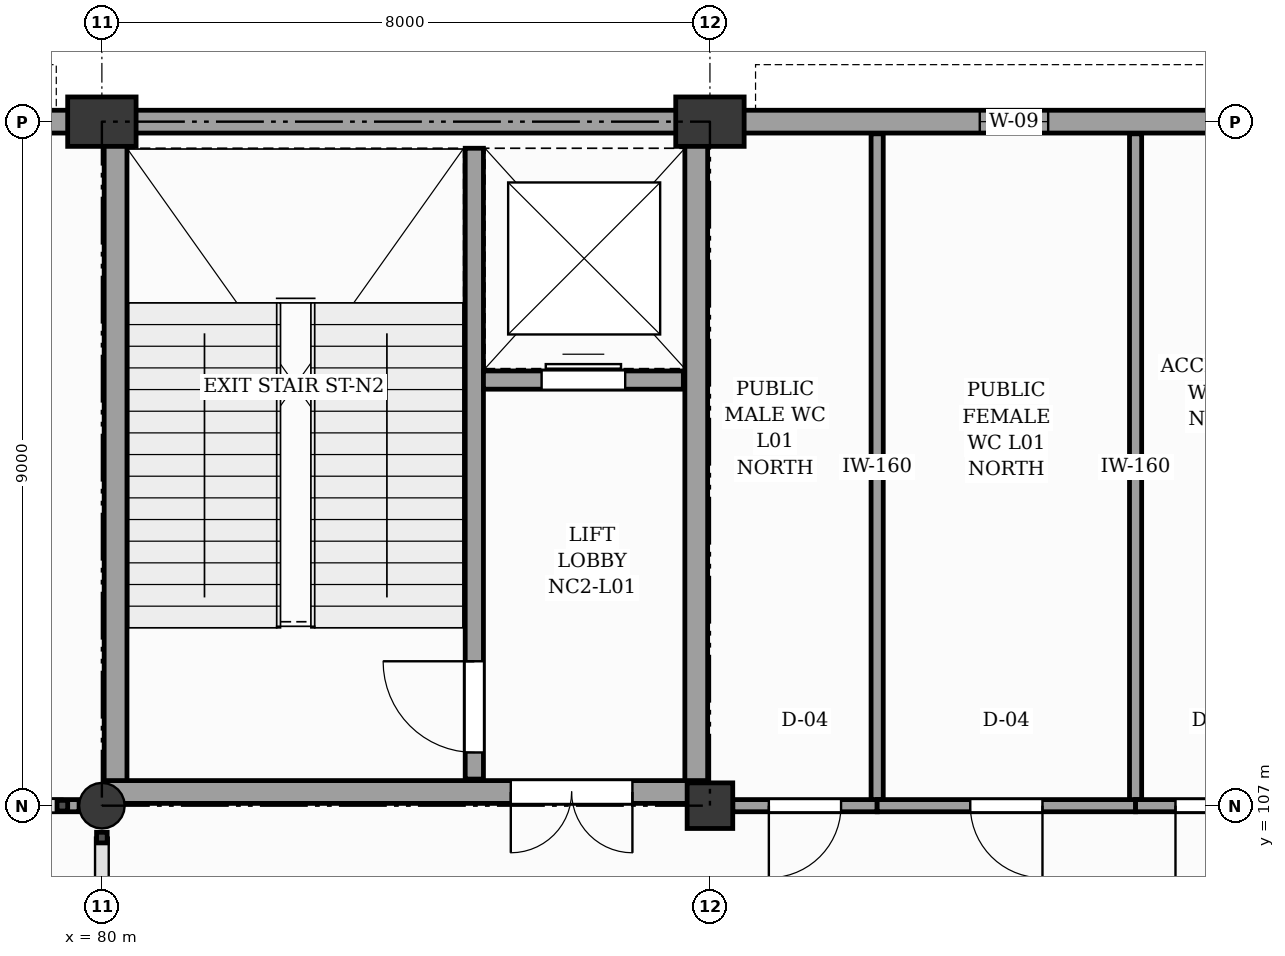
"""IFC4 building model, lengths in metres.
Left out: names, types, materials, properties, quantities, classifications, styles, units other than length and angle.
Written with IfcOpenShell. Run it as: python <this file> out.ifc"""

import sys

from ifc_helpers import new_model, si_unit, direction, frame, frame_2d, origin, origin_2d, place, context, subcontext, project, spatial, rectangle, circle, extrude, element, fill, save


model = new_model("IFC4")
c1 = context("Model", 3, precision=1e-05, world=origin(), true_north=direction((0.0, 1.0)))
c2 = subcontext(c1, "Body", "Model", "MODEL_VIEW")
j1 = project(units=[si_unit("LENGTHUNIT", "METRE"), si_unit("PLANEANGLEUNIT", "RADIAN")], contexts=[c1])
p1 = place(None, origin())
s1 = spatial("IfcSite", under=j1, at=p1, CompositionType="ELEMENT")
p2 = place(p1, origin())
s2 = spatial("IfcBuilding", under=s1, at=p2, CompositionType="ELEMENT")
p3 = place(p2, frame((0.0, 0.0, 4.8)))
s3 = spatial("IfcBuildingStorey", under=s2, at=p3, CompositionType="ELEMENT", Elevation=4.8)
p4 = place(p3, frame((80.0, 107.0, 0.0), z_axis=(0.0, 0.0, 1.0), x_axis=(1.0, 0.0, 0.0)))
e1 = element("IfcColumn", 1, at=p4, inside=s3, PredefinedType="COLUMN", context=c2, shape_type="SweptSolid", body=[
    extrude(circle(Radius=0.3, at=origin_2d()), origin(), (0.0, 0.0, 1.0), 4.8),
])
p5 = place(p3, frame((80.0, 116.0, 0.0), z_axis=(0.0, 0.0, 1.0), x_axis=(1.0, 0.0, 0.0)))
e2 = element("IfcColumn", 2, at=p5, inside=s3, PredefinedType="PILASTER", context=c2, shape_type="SweptSolid", body=[
    extrude(rectangle(XDim=0.9, YDim=0.65, at=origin_2d()), origin(), (0.0, 0.0, 1.0), 4.8),
])
p6 = place(p3, frame((88.0, 107.0, 0.0), z_axis=(0.0, 0.0, 1.0), x_axis=(1.0, 0.0, 0.0)))
e3 = element("IfcColumn", 3, at=p6, inside=s3, PredefinedType="COLUMN", context=c2, shape_type="SweptSolid", body=[
    extrude(rectangle(XDim=0.6, YDim=0.6, at=origin_2d()), origin(), (0.0, 0.0, 1.0), 4.8),
])
p7 = place(p3, frame((88.0, 116.0, 0.0), z_axis=(0.0, 0.0, 1.0), x_axis=(1.0, 0.0, 0.0)))
e4 = element("IfcColumn", 4, at=p7, inside=s3, PredefinedType="PILASTER", context=c2, shape_type="SweptSolid", body=[
    extrude(rectangle(XDim=0.9, YDim=0.65, at=origin_2d()), origin(), (0.0, 0.0, 1.0), 4.8),
])
p8 = place(p3, frame((72.4, 116.0, 0.0), z_axis=(0.0, 0.0, 1.0), x_axis=(1.0, 0.0, 0.0)))
e5 = element("IfcWall", 5, at=p8, inside=s3, PredefinedType="SOLIDWALL", context=c2, shape_type="SweptSolid", body=[
    extrude(rectangle(XDim=7.2, YDim=0.3, at=frame_2d((3.6, 0.0))), origin(), (0.0, 0.0, 1.0), 3.84),
])
p9 = place(p8, frame((2.5, 0.0, 0.9)))
e6 = element("IfcOpeningElement", 6, at=p9, cuts=e5, PredefinedType="OPENING", context=c2, shape_type="SweptSolid", body=[
    extrude(rectangle(XDim=2.2, YDim=2.2, at=frame_2d((1.1, 1.1))), frame((0.0, 0.16, 0.0), z_axis=(0.0, -1.0, 0.0), x_axis=(1.0, 0.0, 0.0)), (0.0, 0.0, 1.0), 0.32),
])
p10 = place(p3, frame((80.4, 116.0, 0.0), z_axis=(0.0, 0.0, 1.0), x_axis=(1.0, 0.0, 0.0)))
e7 = element("IfcWall", 7, at=p10, inside=s3, PredefinedType="SOLIDWALL", context=c2, shape_type="SweptSolid", body=[
    extrude(rectangle(XDim=7.2, YDim=0.3, at=frame_2d((3.6, 0.0))), origin(), (0.0, 0.0, 1.0), 3.84),
])
p11 = place(p3, frame((88.4, 116.0, 0.0), z_axis=(0.0, 0.0, 1.0), x_axis=(1.0, 0.0, 0.0)))
e8 = element("IfcWall", 8, at=p11, inside=s3, PredefinedType="SOLIDWALL", context=c2, shape_type="SweptSolid", body=[
    extrude(rectangle(XDim=7.2, YDim=0.3, at=frame_2d((3.6, 0.0))), origin(), (0.0, 0.0, 1.0), 3.84),
])
p12 = place(p11, frame((3.15, 0.0, 0.9)))
e9 = element("IfcOpeningElement", 9, at=p12, cuts=e8, PredefinedType="OPENING", context=c2, shape_type="SweptSolid", body=[
    extrude(rectangle(XDim=0.9, YDim=1.1, at=frame_2d((0.45, 0.55))), frame((0.0, 0.16, 0.0), z_axis=(0.0, -1.0, 0.0), x_axis=(1.0, 0.0, 0.0)), (0.0, 0.0, 1.0), 0.32),
])
p13 = place(p3, frame((84.9, 107.35, 0.0), z_axis=(0.0, 0.0, 1.0), x_axis=(0.0, 1.0, 0.0)))
e10 = element("IfcWall", 10, at=p13, inside=s3, PredefinedType="SHEAR", context=c2, shape_type="SweptSolid", body=[
    extrude(rectangle(XDim=8.3, YDim=0.24, at=frame_2d((4.15, 0.0))), origin(), (0.0, 0.0, 1.0), 4.52),
])
p14 = place(p13, frame((0.35, 0.0, 0.0)))
e11 = element("IfcOpeningElement", 11, at=p14, cuts=e10, PredefinedType="OPENING", context=c2, shape_type="SweptSolid", body=[
    extrude(rectangle(XDim=1.2, YDim=2.15, at=frame_2d((0.6, 1.075))), frame((0.0, 0.13, 0.0), z_axis=(0.0, -1.0, 0.0), x_axis=(1.0, 0.0, 0.0)), (0.0, 0.0, 1.0), 0.26),
])
p15 = place(p3, frame((85.02, 112.6, 0.0), z_axis=(0.0, 0.0, 1.0), x_axis=(1.0, 0.0, 0.0)))
e12 = element("IfcWall", 12, at=p15, inside=s3, PredefinedType="SHEAR", context=c2, shape_type="SweptSolid", body=[
    extrude(rectangle(XDim=2.63, YDim=0.24, at=frame_2d((1.315, 0.0))), origin(), (0.0, 0.0, 1.0), 4.52),
])
p16 = place(p15, frame((0.765, 0.0, 0.0)))
e13 = element("IfcOpeningElement", 13, at=p16, cuts=e12, PredefinedType="OPENING", context=c2, shape_type="SweptSolid", body=[
    extrude(rectangle(XDim=1.1, YDim=2.15, at=frame_2d((0.55, 1.075))), frame((0.0, 0.13, 0.0), z_axis=(0.0, -1.0, 0.0), x_axis=(1.0, 0.0, 0.0)), (0.0, 0.0, 1.0), 0.26),
])
for number, where, z_axis, x_axis in (
    (14, (80.18, 107.18, 0.0), (0.0, 0.0, 1.0), (0.0, 1.0, 0.0)),
    (15, (87.82, 107.18, 0.0), (0.0, 0.0, 1.0), (0.0, 1.0, 0.0)),
):
    element("IfcWall", number, at=place(p3, frame(where, z_axis=z_axis, x_axis=x_axis)), inside=s3, PredefinedType="SHEAR", context=c2, shape_type="SweptSolid", body=[
        extrude(rectangle(XDim=8.64, YDim=0.3, at=frame_2d((4.32, 0.0))), origin(), (0.0, 0.0, 1.0), 4.52),
    ])
p17 = place(p3, frame((80.03, 107.18, 0.0), z_axis=(0.0, 0.0, 1.0), x_axis=(1.0, 0.0, 0.0)))
e16 = element("IfcWall", 16, at=p17, inside=s3, PredefinedType="SHEAR", context=c2, shape_type="SweptSolid", body=[
    extrude(rectangle(XDim=7.94, YDim=0.3, at=frame_2d((3.97, 0.0))), origin(), (0.0, 0.0, 1.0), 4.52),
])
p18 = place(p17, frame((5.35, 0.0, 0.0)))
e17 = element("IfcOpeningElement", 17, at=p18, cuts=e16, PredefinedType="OPENING", context=c2, shape_type="SweptSolid", body=[
    extrude(rectangle(XDim=1.6, YDim=2.15, at=frame_2d((0.8, 1.075))), frame((0.0, 0.16, 0.0), z_axis=(0.0, -1.0, 0.0), x_axis=(1.0, 0.0, 0.0)), (0.0, 0.0, 1.0), 0.32),
])
p19 = place(p3, frame((76.0, 107.0, 0.0), z_axis=(0.0, 0.0, 1.0), x_axis=(1.0, 0.0, 0.0)))
e18 = element("IfcWall", 18, at=p19, inside=s3, PredefinedType="PARTITIONING", context=c2, shape_type="SweptSolid", body=[
    extrude(rectangle(XDim=3.7, YDim=0.16, at=frame_2d((1.85, 0.0))), origin(), (0.0, 0.0, 1.0), 3.7),
])
p20 = place(p19, frame((0.2, 0.0, 0.0)))
e19 = element("IfcOpeningElement", 19, at=p20, cuts=e18, PredefinedType="OPENING", context=c2, shape_type="SweptSolid", body=[
    extrude(rectangle(XDim=1.8, YDim=2.25, at=frame_2d((0.9, 1.125))), frame((0.0, 0.09, 0.0), z_axis=(0.0, -1.0, 0.0), x_axis=(1.0, 0.0, 0.0)), (0.0, 0.0, 1.0), 0.18),
])
p21 = place(p3, frame((88.3, 107.0, 0.0), z_axis=(0.0, 0.0, 1.0), x_axis=(1.0, 0.0, 0.0)))
e20 = element("IfcWall", 20, at=p21, inside=s3, PredefinedType="PARTITIONING", context=c2, shape_type="SweptSolid", body=[
    extrude(rectangle(XDim=1.9, YDim=0.16, at=frame_2d((0.95, 0.0))), origin(), (0.0, 0.0, 1.0), 3.7),
])
p22 = place(p21, frame((0.475, 0.0, 0.0)))
e21 = element("IfcOpeningElement", 21, at=p22, cuts=e20, PredefinedType="OPENING", context=c2, shape_type="SweptSolid", body=[
    extrude(rectangle(XDim=0.95, YDim=2.1, at=frame_2d((0.475, 1.05))), frame((0.0, 0.09, 0.0), z_axis=(0.0, -1.0, 0.0), x_axis=(1.0, 0.0, 0.0)), (0.0, 0.0, 1.0), 0.18),
])
p23 = place(p3, frame((90.2, 107.08, 0.0), z_axis=(0.0, 0.0, 1.0), x_axis=(0.0, 1.0, 0.0)))
e22 = element("IfcWall", 22, at=p23, inside=s3, PredefinedType="PARTITIONING", context=c2, shape_type="SweptSolid", body=[
    extrude(rectangle(XDim=8.76, YDim=0.16, at=frame_2d((4.38, 0.0))), origin(), (0.0, 0.0, 1.0), 3.7),
])
p24 = place(p3, frame((90.2, 107.0, 0.0), z_axis=(0.0, 0.0, 1.0), x_axis=(1.0, 0.0, 0.0)))
e23 = element("IfcWall", 23, at=p24, inside=s3, PredefinedType="PARTITIONING", context=c2, shape_type="SweptSolid", body=[
    extrude(rectangle(XDim=3.4, YDim=0.16, at=frame_2d((1.7, 0.0))), origin(), (0.0, 0.0, 1.0), 3.7),
])
p25 = place(p24, frame((1.225, 0.0, 0.0)))
e24 = element("IfcOpeningElement", 24, at=p25, cuts=e23, PredefinedType="OPENING", context=c2, shape_type="SweptSolid", body=[
    extrude(rectangle(XDim=0.95, YDim=2.1, at=frame_2d((0.475, 1.05))), frame((0.0, 0.09, 0.0), z_axis=(0.0, -1.0, 0.0), x_axis=(1.0, 0.0, 0.0)), (0.0, 0.0, 1.0), 0.18),
])
p26 = place(p3, frame((93.6, 107.08, 0.0), z_axis=(0.0, 0.0, 1.0), x_axis=(0.0, 1.0, 0.0)))
e25 = element("IfcWall", 25, at=p26, inside=s3, PredefinedType="PARTITIONING", context=c2, shape_type="SweptSolid", body=[
    extrude(rectangle(XDim=8.76, YDim=0.16, at=frame_2d((4.38, 0.0))), origin(), (0.0, 0.0, 1.0), 3.7),
])
p27 = place(p3, frame((93.6, 107.0, 0.0), z_axis=(0.0, 0.0, 1.0), x_axis=(1.0, 0.0, 0.0)))
e26 = element("IfcWall", 26, at=p27, inside=s3, PredefinedType="PARTITIONING", context=c2, shape_type="SweptSolid", body=[
    extrude(rectangle(XDim=2.1, YDim=0.16, at=frame_2d((1.05, 0.0))), origin(), (0.0, 0.0, 1.0), 3.7),
])
p28 = place(p27, frame((0.525, 0.0, 0.0)))
e27 = element("IfcOpeningElement", 27, at=p28, cuts=e26, PredefinedType="OPENING", context=c2, shape_type="SweptSolid", body=[
    extrude(rectangle(XDim=1.05, YDim=2.1, at=frame_2d((0.525, 1.05))), frame((0.0, 0.09, 0.0), z_axis=(0.0, -1.0, 0.0), x_axis=(1.0, 0.0, 0.0)), (0.0, 0.0, 1.0), 0.18),
])
p29 = place(p12, origin())
e28 = element("IfcWindow", 28, at=p29, inside=s3, PartitioningType="SINGLE_PANEL", PredefinedType="WINDOW", context=c2, shape_type="SweptSolid", body=[
    extrude(rectangle(XDim=0.9, YDim=1.1, at=frame_2d((0.45, 0.55))), frame((0.0, 0.03, 0.0), z_axis=(0.0, -1.0, 0.0), x_axis=(1.0, 0.0, 0.0)), (0.0, 0.0, 1.0), 0.06),
])
fill(e9, e28)
p30 = place(p14, origin())
e29 = element("IfcDoor", 29, at=p30, inside=s3, OperationType="SINGLE_SWING_RIGHT", PredefinedType="DOOR", context=c2, shape_type="SweptSolid", body=[
    extrude(rectangle(XDim=1.2, YDim=2.15, at=frame_2d((0.6, 1.075))), frame((0.0, 0.025, 0.0), z_axis=(0.0, -1.0, 0.0), x_axis=(1.0, 0.0, 0.0)), (0.0, 0.0, 1.0), 0.05),
])
fill(e11, e29)
p31 = place(p16, origin())
e30 = element("IfcDoor", 30, at=p31, inside=s3, OperationType="DOUBLE_DOOR_SLIDING", PredefinedType="DOOR", context=c2, shape_type="SweptSolid", body=[
    extrude(rectangle(XDim=1.1, YDim=2.15, at=frame_2d((0.55, 1.075))), frame((0.0, 0.025, 0.0), z_axis=(0.0, -1.0, 0.0), x_axis=(1.0, 0.0, 0.0)), (0.0, 0.0, 1.0), 0.05),
])
fill(e13, e30)
p32 = place(p18, frame((1.6, 0.0, 0.0), z_axis=(0.0, 0.0, 1.0), x_axis=(-1.0, 0.0, 0.0)))
e31 = element("IfcDoor", 31, at=p32, inside=s3, OperationType="DOUBLE_DOOR_SINGLE_SWING", PredefinedType="DOOR", context=c2, shape_type="SweptSolid", body=[
    extrude(rectangle(XDim=1.6, YDim=2.15, at=frame_2d((0.8, 1.075))), frame((0.0, 0.025, 0.0), z_axis=(0.0, -1.0, 0.0), x_axis=(1.0, 0.0, 0.0)), (0.0, 0.0, 1.0), 0.05),
])
fill(e17, e31)
p33 = place(p22, frame((0.95, 0.0, 0.0), z_axis=(0.0, 0.0, 1.0), x_axis=(-1.0, 0.0, 0.0)))
e32 = element("IfcDoor", 32, at=p33, inside=s3, OperationType="SINGLE_SWING_LEFT", PredefinedType="DOOR", context=c2, shape_type="SweptSolid", body=[
    extrude(rectangle(XDim=0.95, YDim=2.1, at=frame_2d((0.475, 1.05))), frame((0.0, 0.025, 0.0), z_axis=(0.0, -1.0, 0.0), x_axis=(1.0, 0.0, 0.0)), (0.0, 0.0, 1.0), 0.05),
])
fill(e21, e32)
p34 = place(p25, frame((0.95, 0.0, 0.0), z_axis=(0.0, 0.0, 1.0), x_axis=(-1.0, 0.0, 0.0)))
e33 = element("IfcDoor", 33, at=p34, inside=s3, OperationType="SINGLE_SWING_RIGHT", PredefinedType="DOOR", context=c2, shape_type="SweptSolid", body=[
    extrude(rectangle(XDim=0.95, YDim=2.1, at=frame_2d((0.475, 1.05))), frame((0.0, 0.025, 0.0), z_axis=(0.0, -1.0, 0.0), x_axis=(1.0, 0.0, 0.0)), (0.0, 0.0, 1.0), 0.05),
])
fill(e24, e33)
p35 = place(p28, frame((1.05, 0.0, 0.0), z_axis=(0.0, 0.0, 1.0), x_axis=(-1.0, 0.0, 0.0)))
e34 = element("IfcDoor", 34, at=p35, inside=s3, OperationType="SINGLE_SWING_LEFT", PredefinedType="DOOR", context=c2, shape_type="SweptSolid", body=[
    extrude(rectangle(XDim=1.05, YDim=2.1, at=frame_2d((0.525, 1.05))), frame((0.0, 0.025, 0.0), z_axis=(0.0, -1.0, 0.0), x_axis=(1.0, 0.0, 0.0)), (0.0, 0.0, 1.0), 0.05),
])
fill(e27, e34)
save(model, sys.argv[1])
